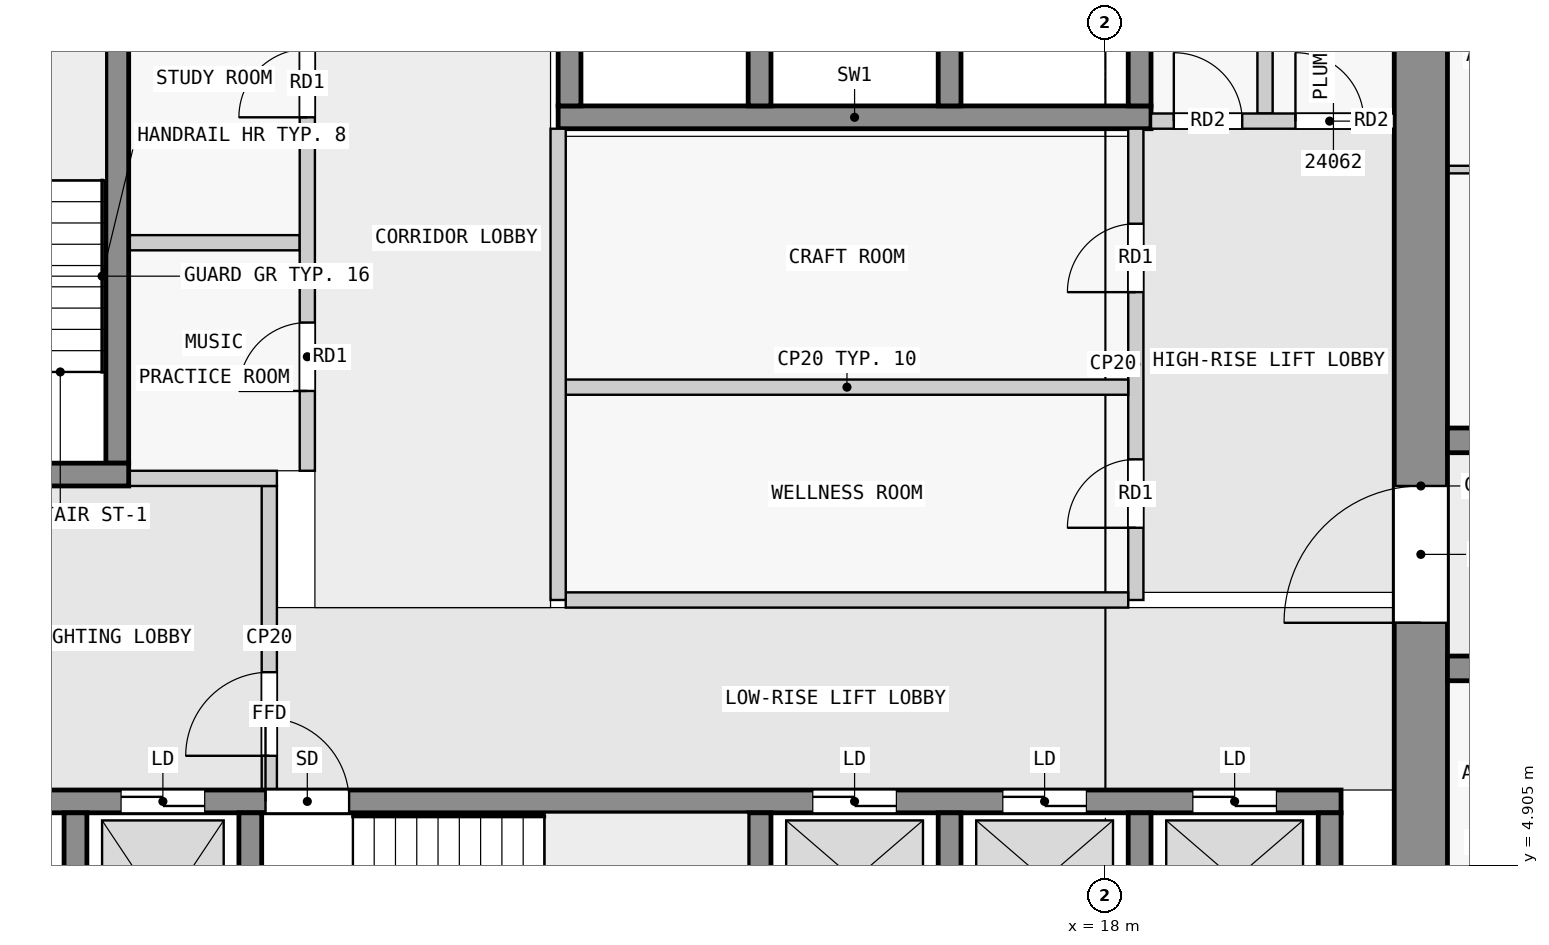
"""IFC4 building model, lengths in metres.
Left out: names, types, materials, properties, quantities, classifications, styles, units other than length and angle.
Written with IfcOpenShell. Run it as: python <this file> out.ifc"""

import sys

from ifc_helpers import new_model, si_unit, direction, frame, frame_2d, origin, place, context, subcontext, project, spatial, rectangle, extrude, element, fill, save


model = new_model("IFC4")
c1 = context("Model", 3, precision=1e-05, world=origin(), true_north=direction((0.0, 1.0)))
c2 = subcontext(c1, "Body", "Model", "MODEL_VIEW")
j1 = project(units=[si_unit("LENGTHUNIT", "METRE"), si_unit("PLANEANGLEUNIT", "RADIAN")], contexts=[c1])
p1 = place(None, origin())
s1 = spatial("IfcSite", under=j1, at=p1, CompositionType="ELEMENT")
p2 = place(p1, origin())
s2 = spatial("IfcBuilding", under=s1, at=p2, CompositionType="ELEMENT")
p3 = place(p2, frame((0.0, 0.0, 95.8)))
s3 = spatial("IfcBuildingStorey", under=s2, at=p3, CompositionType="ELEMENT", Elevation=95.8)
p4 = place(p3, frame((22.15, 2.5, 0.0), z_axis=(0.0, 0.0, 1.0), x_axis=(0.0, 1.0, 0.0)))
e1 = element("IfcWall", 1, at=p4, inside=s3, PredefinedType="SHEAR", context=c2, shape_type="SweptSolid", body=[
    extrude(rectangle(XDim=14.8, YDim=0.7, at=frame_2d((7.4, 0.0))), origin(), (0.0, 0.0, 1.0), 3.25),
])
p5 = place(p4, frame((5.6, 0.0, 0.0)))
e2 = element("IfcOpeningElement", 2, at=p5, cuts=e1, PredefinedType="OPENING", context=c2, shape_type="SweptSolid", body=[
    extrude(rectangle(XDim=1.8, YDim=2.1, at=frame_2d((0.9, 1.05))), frame((0.0, 0.36, 0.0), z_axis=(0.0, -1.0, 0.0), x_axis=(1.0, 0.0, 0.0)), (0.0, 0.0, 1.0), 0.72),
])
for number, where, z_axis, x_axis in (
    (3, (4.45, 2.8, 0.0), (0.0, 0.0, 1.0), (0.0, 1.0, 0.0)),
    (4, (6.75, 2.8, 0.0), (0.0, 0.0, 1.0), (0.0, 1.0, 0.0)),
    (5, (13.45, 2.8, 0.0), (0.0, 0.0, 1.0), (0.0, 1.0, 0.0)),
    (6, (15.95, 2.8, 0.0), (0.0, 0.0, 1.0), (0.0, 1.0, 0.0)),
    (7, (18.45, 2.8, 0.0), (0.0, 0.0, 1.0), (0.0, 1.0, 0.0)),
    (8, (20.95, 2.8, 0.0), (0.0, 0.0, 1.0), (0.0, 1.0, 0.0)),
):
    element("IfcWall", number, at=place(p3, frame(where, z_axis=z_axis, x_axis=x_axis)), inside=s3, PredefinedType="SHEAR", context=c2, shape_type="SweptSolid", body=[
        extrude(rectangle(XDim=2.8, YDim=0.3, at=frame_2d((1.4, 0.0))), origin(), (0.0, 0.0, 1.0), 3.25),
    ])
p6 = place(p3, frame((2.3, 5.75, 0.0), z_axis=(0.0, 0.0, 1.0), x_axis=(1.0, 0.0, 0.0)))
e9 = element("IfcWall", 9, at=p6, inside=s3, PredefinedType="SHEAR", context=c2, shape_type="SweptSolid", body=[
    extrude(rectangle(XDim=18.8, YDim=0.3, at=frame_2d((9.4, 0.0))), origin(), (0.0, 0.0, 1.0), 3.25),
])
p7 = place(p6, frame((4.65, 0.0, 0.0)))
e10 = element("IfcOpeningElement", 10, at=p7, cuts=e9, PredefinedType="OPENING", context=c2, shape_type="SweptSolid", body=[
    extrude(rectangle(XDim=1.1, YDim=2.1, at=frame_2d((0.55, 1.05))), frame((0.0, 0.16, 0.0), z_axis=(0.0, -1.0, 0.0), x_axis=(1.0, 0.0, 0.0)), (0.0, 0.0, 1.0), 0.32),
])
p8 = place(p6, frame((0.45, 0.0, 0.0)))
e11 = element("IfcOpeningElement", 11, at=p8, cuts=e9, PredefinedType="OPENING", context=c2, shape_type="SweptSolid", body=[
    extrude(rectangle(XDim=1.1, YDim=2.1, at=frame_2d((0.55, 1.05))), frame((0.0, 0.16, 0.0), z_axis=(0.0, -1.0, 0.0), x_axis=(1.0, 0.0, 0.0)), (0.0, 0.0, 1.0), 0.32),
])
p9 = place(p6, frame((2.75, 0.0, 0.0)))
e12 = element("IfcOpeningElement", 12, at=p9, cuts=e9, PredefinedType="OPENING", context=c2, shape_type="SweptSolid", body=[
    extrude(rectangle(XDim=1.1, YDim=2.1, at=frame_2d((0.55, 1.05))), frame((0.0, 0.16, 0.0), z_axis=(0.0, -1.0, 0.0), x_axis=(1.0, 0.0, 0.0)), (0.0, 0.0, 1.0), 0.32),
])
p10 = place(p6, frame((11.85, 0.0, 0.0)))
e13 = element("IfcOpeningElement", 13, at=p10, cuts=e9, PredefinedType="OPENING", context=c2, shape_type="SweptSolid", body=[
    extrude(rectangle(XDim=1.1, YDim=2.1, at=frame_2d((0.55, 1.05))), frame((0.0, 0.16, 0.0), z_axis=(0.0, -1.0, 0.0), x_axis=(1.0, 0.0, 0.0)), (0.0, 0.0, 1.0), 0.32),
])
p11 = place(p6, frame((14.35, 0.0, 0.0)))
e14 = element("IfcOpeningElement", 14, at=p11, cuts=e9, PredefinedType="OPENING", context=c2, shape_type="SweptSolid", body=[
    extrude(rectangle(XDim=1.1, YDim=2.1, at=frame_2d((0.55, 1.05))), frame((0.0, 0.16, 0.0), z_axis=(0.0, -1.0, 0.0), x_axis=(1.0, 0.0, 0.0)), (0.0, 0.0, 1.0), 0.32),
])
p12 = place(p6, frame((16.85, 0.0, 0.0)))
e15 = element("IfcOpeningElement", 15, at=p12, cuts=e9, PredefinedType="OPENING", context=c2, shape_type="SweptSolid", body=[
    extrude(rectangle(XDim=1.1, YDim=2.1, at=frame_2d((0.55, 1.05))), frame((0.0, 0.16, 0.0), z_axis=(0.0, -1.0, 0.0), x_axis=(1.0, 0.0, 0.0)), (0.0, 0.0, 1.0), 0.32),
])
p13 = place(p3, frame((2.3, 10.05, 0.0), z_axis=(0.0, 0.0, 1.0), x_axis=(1.0, 0.0, 0.0)))
e16 = element("IfcWall", 16, at=p13, inside=s3, PredefinedType="SHEAR", context=c2, shape_type="SweptSolid", body=[
    extrude(rectangle(XDim=2.85, YDim=0.3, at=frame_2d((1.425, 0.0))), origin(), (0.0, 0.0, 1.0), 3.25),
])
p14 = place(p13, frame((0.25, 0.0, 0.0)))
e17 = element("IfcOpeningElement", 17, at=p14, cuts=e16, PredefinedType="OPENING", context=c2, shape_type="SweptSolid", body=[
    extrude(rectangle(XDim=1.1, YDim=2.1, at=frame_2d((0.55, 1.05))), frame((0.0, 0.16, 0.0), z_axis=(0.0, -1.0, 0.0), x_axis=(1.0, 0.0, 0.0)), (0.0, 0.0, 1.0), 0.32),
])
p15 = place(p3, frame((5.0, 10.2, 0.0), z_axis=(0.0, 0.0, 1.0), x_axis=(0.0, 1.0, 0.0)))
e18 = element("IfcWall", 18, at=p15, inside=s3, PredefinedType="SHEAR", context=c2, shape_type="SweptSolid", body=[
    extrude(rectangle(XDim=6.4, YDim=0.3, at=frame_2d((3.2, 0.0))), origin(), (0.0, 0.0, 1.0), 3.25),
])
p16 = place(p3, frame((10.8, 14.75, 0.0), z_axis=(0.0, 0.0, 1.0), x_axis=(1.0, 0.0, 0.0)))
e19 = element("IfcWall", 19, at=p16, inside=s3, PredefinedType="SHEAR", context=c2, shape_type="SweptSolid", body=[
    extrude(rectangle(XDim=7.8, YDim=0.3, at=frame_2d((3.9, 0.0))), origin(), (0.0, 0.0, 1.0), 3.25),
])
for number, where, z_axis, x_axis in (
    (20, (10.95, 14.9, 0.0), (0.0, 0.0, 1.0), (0.0, 1.0, 0.0)),
    (21, (13.45, 14.9, 0.0), (0.0, 0.0, 1.0), (0.0, 1.0, 0.0)),
    (22, (15.95, 14.9, 0.0), (0.0, 0.0, 1.0), (0.0, 1.0, 0.0)),
    (23, (18.45, 14.9, 0.0), (0.0, 0.0, 1.0), (0.0, 1.0, 0.0)),
):
    element("IfcWall", number, at=place(p3, frame(where, z_axis=z_axis, x_axis=x_axis)), inside=s3, PredefinedType="SHEAR", context=c2, shape_type="SweptSolid", body=[
        extrude(rectangle(XDim=2.0, YDim=0.3, at=frame_2d((1.0, 0.0))), origin(), (0.0, 0.0, 1.0), 3.25),
    ])
p17 = place(p3, frame((22.5, 7.5, 0.0), z_axis=(0.0, 0.0, 1.0), x_axis=(1.0, 0.0, 0.0)))
e24 = element("IfcWall", 24, at=p17, inside=s3, PredefinedType="SHEAR", context=c2, shape_type="SweptSolid", body=[
    extrude(rectangle(XDim=22.5, YDim=0.325, at=frame_2d((11.25, 0.0))), origin(), (0.0, 0.0, 1.0), 3.25),
])
p18 = place(p17, frame((5.65, 0.0, 0.0)))
e25 = element("IfcOpeningElement", 25, at=p18, cuts=e24, PredefinedType="OPENING", context=c2, shape_type="SweptSolid", body=[
    extrude(rectangle(XDim=1.0, YDim=2.1, at=frame_2d((0.5, 1.05))), frame((0.0, 0.172, 0.0), z_axis=(0.0, -1.0, 0.0), x_axis=(1.0, 0.0, 0.0)), (0.0, 0.0, 1.0), 0.345),
])
p19 = place(p17, frame((15.25, 0.0, 0.0)))
e26 = element("IfcOpeningElement", 26, at=p19, cuts=e24, PredefinedType="OPENING", context=c2, shape_type="SweptSolid", body=[
    extrude(rectangle(XDim=1.0, YDim=2.1, at=frame_2d((0.5, 1.05))), frame((0.0, 0.172, 0.0), z_axis=(0.0, -1.0, 0.0), x_axis=(1.0, 0.0, 0.0)), (0.0, 0.0, 1.0), 0.345),
])
p20 = place(p17, frame((18.75, 0.0, 0.0)))
e27 = element("IfcOpeningElement", 27, at=p20, cuts=e24, PredefinedType="OPENING", context=c2, shape_type="SweptSolid", body=[
    extrude(rectangle(XDim=0.9, YDim=2.1, at=frame_2d((0.45, 1.05))), frame((0.0, 0.172, 0.0), z_axis=(0.0, -1.0, 0.0), x_axis=(1.0, 0.0, 0.0)), (0.0, 0.0, 1.0), 0.345),
])
p21 = place(p17, frame((20.95, 0.0, 0.0)))
e28 = element("IfcOpeningElement", 28, at=p21, cuts=e24, PredefinedType="OPENING", context=c2, shape_type="SweptSolid", body=[
    extrude(rectangle(XDim=1.0, YDim=2.1, at=frame_2d((0.5, 1.05))), frame((0.0, 0.172, 0.0), z_axis=(0.0, -1.0, 0.0), x_axis=(1.0, 0.0, 0.0)), (0.0, 0.0, 1.0), 0.345),
])
p22 = place(p3, frame((22.5, 10.5, 0.0), z_axis=(0.0, 0.0, 1.0), x_axis=(1.0, 0.0, 0.0)))
e29 = element("IfcWall", 29, at=p22, inside=s3, PredefinedType="SHEAR", context=c2, shape_type="SweptSolid", body=[
    extrude(rectangle(XDim=22.5, YDim=0.325, at=frame_2d((11.25, 0.0))), origin(), (0.0, 0.0, 1.0), 3.25),
])
p23 = place(p22, frame((4.75, 0.0, 0.0)))
e30 = element("IfcOpeningElement", 30, at=p23, cuts=e29, PredefinedType="OPENING", context=c2, shape_type="SweptSolid", body=[
    extrude(rectangle(XDim=1.0, YDim=2.1, at=frame_2d((0.5, 1.05))), frame((0.0, 0.172, 0.0), z_axis=(0.0, -1.0, 0.0), x_axis=(1.0, 0.0, 0.0)), (0.0, 0.0, 1.0), 0.345),
])
p24 = place(p22, frame((16.85, 0.0, 0.0)))
e31 = element("IfcOpeningElement", 31, at=p24, cuts=e29, PredefinedType="OPENING", context=c2, shape_type="SweptSolid", body=[
    extrude(rectangle(XDim=1.0, YDim=2.1, at=frame_2d((0.5, 1.05))), frame((0.0, 0.172, 0.0), z_axis=(0.0, -1.0, 0.0), x_axis=(1.0, 0.0, 0.0)), (0.0, 0.0, 1.0), 0.345),
])
p25 = place(p3, frame((7.0, 5.9, 0.0), z_axis=(0.0, 0.0, 1.0), x_axis=(0.0, 1.0, 0.0)))
e32 = element("IfcWall", 32, at=p25, inside=s3, PredefinedType="PARTITIONING", context=c2, shape_type="SweptSolid", body=[
    extrude(rectangle(XDim=4.0, YDim=0.2, at=frame_2d((2.0, 0.0))), origin(), (0.0, 0.0, 1.0), 3.25),
])
p26 = place(p25, frame((0.45, 0.0, 0.0)))
e33 = element("IfcOpeningElement", 33, at=p26, cuts=e32, PredefinedType="OPENING", context=c2, shape_type="SweptSolid", body=[
    extrude(rectangle(XDim=1.1, YDim=2.1, at=frame_2d((0.55, 1.05))), frame((0.0, 0.11, 0.0), z_axis=(0.0, -1.0, 0.0), x_axis=(1.0, 0.0, 0.0)), (0.0, 0.0, 1.0), 0.22),
])
p27 = place(p3, frame((5.15, 10.0, 0.0), z_axis=(0.0, 0.0, 1.0), x_axis=(1.0, 0.0, 0.0)))
e34 = element("IfcWall", 34, at=p27, inside=s3, PredefinedType="PARTITIONING", context=c2, shape_type="SweptSolid", body=[
    extrude(rectangle(XDim=1.95, YDim=0.2, at=frame_2d((0.975, 0.0))), origin(), (0.0, 0.0, 1.0), 3.25),
])
p28 = place(p3, frame((10.8, 8.4, 0.0), z_axis=(0.0, 0.0, 1.0), x_axis=(0.0, 1.0, 0.0)))
e35 = element("IfcWall", 35, at=p28, inside=s3, PredefinedType="PARTITIONING", context=c2, shape_type="SweptSolid", body=[
    extrude(rectangle(XDim=6.2, YDim=0.2, at=frame_2d((3.1, 0.0))), origin(), (0.0, 0.0, 1.0), 3.25),
])
p29 = place(p3, frame((10.9, 8.4, 0.0), z_axis=(0.0, 0.0, 1.0), x_axis=(1.0, 0.0, 0.0)))
e36 = element("IfcWall", 36, at=p29, inside=s3, PredefinedType="PARTITIONING", context=c2, shape_type="SweptSolid", body=[
    extrude(rectangle(XDim=7.4, YDim=0.2, at=frame_2d((3.7, 0.0))), origin(), (0.0, 0.0, 1.0), 3.25),
])
p30 = place(p3, frame((18.4, 8.4, 0.0), z_axis=(0.0, 0.0, 1.0), x_axis=(0.0, 1.0, 0.0)))
e37 = element("IfcWall", 37, at=p30, inside=s3, PredefinedType="PARTITIONING", context=c2, shape_type="SweptSolid", body=[
    extrude(rectangle(XDim=6.2, YDim=0.2, at=frame_2d((3.1, 0.0))), origin(), (0.0, 0.0, 1.0), 3.25),
])
p31 = place(p30, frame((0.95, 0.0, 0.0)))
e38 = element("IfcOpeningElement", 38, at=p31, cuts=e37, PredefinedType="OPENING", context=c2, shape_type="SweptSolid", body=[
    extrude(rectangle(XDim=0.9, YDim=2.1, at=frame_2d((0.45, 1.05))), frame((0.0, 0.11, 0.0), z_axis=(0.0, -1.0, 0.0), x_axis=(1.0, 0.0, 0.0)), (0.0, 0.0, 1.0), 0.22),
])
p32 = place(p30, frame((4.05, 0.0, 0.0)))
e39 = element("IfcOpeningElement", 39, at=p32, cuts=e37, PredefinedType="OPENING", context=c2, shape_type="SweptSolid", body=[
    extrude(rectangle(XDim=0.9, YDim=2.1, at=frame_2d((0.45, 1.05))), frame((0.0, 0.11, 0.0), z_axis=(0.0, -1.0, 0.0), x_axis=(1.0, 0.0, 0.0)), (0.0, 0.0, 1.0), 0.22),
])
p33 = place(p3, frame((10.9, 11.2, 0.0), z_axis=(0.0, 0.0, 1.0), x_axis=(1.0, 0.0, 0.0)))
e40 = element("IfcWall", 40, at=p33, inside=s3, PredefinedType="PARTITIONING", context=c2, shape_type="SweptSolid", body=[
    extrude(rectangle(XDim=7.4, YDim=0.2, at=frame_2d((3.7, 0.0))), origin(), (0.0, 0.0, 1.0), 3.25),
])
p34 = place(p3, frame((7.5, 10.1, 0.0), z_axis=(0.0, 0.0, 1.0), x_axis=(0.0, 1.0, 0.0)))
e41 = element("IfcWall", 41, at=p34, inside=s3, PredefinedType="PARTITIONING", context=c2, shape_type="SweptSolid", body=[
    extrude(rectangle(XDim=7.2, YDim=0.2, at=frame_2d((3.6, 0.0))), origin(), (0.0, 0.0, 1.0), 3.25),
])
p35 = place(p34, frame((1.05, 0.0, 0.0)))
e42 = element("IfcOpeningElement", 42, at=p35, cuts=e41, PredefinedType="OPENING", context=c2, shape_type="SweptSolid", body=[
    extrude(rectangle(XDim=0.9, YDim=2.1, at=frame_2d((0.45, 1.05))), frame((0.0, 0.11, 0.0), z_axis=(0.0, -1.0, 0.0), x_axis=(1.0, 0.0, 0.0)), (0.0, 0.0, 1.0), 0.22),
])
p36 = place(p34, frame((4.65, 0.0, 0.0)))
e43 = element("IfcOpeningElement", 43, at=p36, cuts=e41, PredefinedType="OPENING", context=c2, shape_type="SweptSolid", body=[
    extrude(rectangle(XDim=0.9, YDim=2.1, at=frame_2d((0.45, 1.05))), frame((0.0, 0.11, 0.0), z_axis=(0.0, -1.0, 0.0), x_axis=(1.0, 0.0, 0.0)), (0.0, 0.0, 1.0), 0.22),
])
p37 = place(p3, frame((5.15, 13.1, 0.0), z_axis=(0.0, 0.0, 1.0), x_axis=(1.0, 0.0, 0.0)))
e44 = element("IfcWall", 44, at=p37, inside=s3, PredefinedType="PARTITIONING", context=c2, shape_type="SweptSolid", body=[
    extrude(rectangle(XDim=2.25, YDim=0.2, at=frame_2d((1.125, 0.0))), origin(), (0.0, 0.0, 1.0), 3.25),
])
p38 = place(p3, frame((18.6, 14.7, 0.0), z_axis=(0.0, 0.0, 1.0), x_axis=(1.0, 0.0, 0.0)))
e45 = element("IfcWall", 45, at=p38, inside=s3, PredefinedType="PARTITIONING", context=c2, shape_type="SweptSolid", body=[
    extrude(rectangle(XDim=3.2, YDim=0.2, at=frame_2d((1.6, 0.0))), origin(), (0.0, 0.0, 1.0), 3.25),
])
p39 = place(p38, frame((0.3, 0.0, 0.0)))
e46 = element("IfcOpeningElement", 46, at=p39, cuts=e45, PredefinedType="OPENING", context=c2, shape_type="SweptSolid", body=[
    extrude(rectangle(XDim=0.9, YDim=2.1, at=frame_2d((0.45, 1.05))), frame((0.0, 0.11, 0.0), z_axis=(0.0, -1.0, 0.0), x_axis=(1.0, 0.0, 0.0)), (0.0, 0.0, 1.0), 0.22),
])
p40 = place(p38, frame((1.9, 0.0, 0.0)))
e47 = element("IfcOpeningElement", 47, at=p40, cuts=e45, PredefinedType="OPENING", context=c2, shape_type="SweptSolid", body=[
    extrude(rectangle(XDim=0.9, YDim=2.1, at=frame_2d((0.45, 1.05))), frame((0.0, 0.11, 0.0), z_axis=(0.0, -1.0, 0.0), x_axis=(1.0, 0.0, 0.0)), (0.0, 0.0, 1.0), 0.22),
])
p41 = place(p3, frame((20.1, 14.8, 0.0), z_axis=(0.0, 0.0, 1.0), x_axis=(0.0, 1.0, 0.0)))
e48 = element("IfcWall", 48, at=p41, inside=s3, PredefinedType="PARTITIONING", context=c2, shape_type="SweptSolid", body=[
    extrude(rectangle(XDim=2.5, YDim=0.2, at=frame_2d((1.25, 0.0))), origin(), (0.0, 0.0, 1.0), 3.25),
])
p42 = place(p3, frame((22.5, 14.062, 0.0), z_axis=(0.0, 0.0, 1.0), x_axis=(1.0, 0.0, 0.0)))
e49 = element("IfcWall", 49, at=p42, inside=s3, PredefinedType="PARTITIONING", context=c2, shape_type="SweptSolid", body=[
    extrude(rectangle(XDim=9.0, YDim=0.1, at=frame_2d((4.5, 0.0))), origin(), (0.0, 0.0, 1.0), 3.25),
])
p43 = place(p42, frame((1.85, 0.0, 0.0)))
e50 = element("IfcOpeningElement", 50, at=p43, cuts=e49, PredefinedType="OPENING", context=c2, shape_type="SweptSolid", body=[
    extrude(rectangle(XDim=0.9, YDim=2.1, at=frame_2d((0.45, 1.05))), frame((0.0, 0.06, 0.0), z_axis=(0.0, -1.0, 0.0), x_axis=(1.0, 0.0, 0.0)), (0.0, 0.0, 1.0), 0.12),
])
p44 = place(p42, frame((6.25, 0.0, 0.0)))
e51 = element("IfcOpeningElement", 51, at=p44, cuts=e49, PredefinedType="OPENING", context=c2, shape_type="SweptSolid", body=[
    extrude(rectangle(XDim=0.9, YDim=2.1, at=frame_2d((0.45, 1.05))), frame((0.0, 0.06, 0.0), z_axis=(0.0, -1.0, 0.0), x_axis=(1.0, 0.0, 0.0)), (0.0, 0.0, 1.0), 0.12),
])
p45 = place(p26, origin())
e52 = element("IfcDoor", 52, at=p45, inside=s3, OperationType="SINGLE_SWING_LEFT", PredefinedType="DOOR", context=c2, shape_type="SweptSolid", body=[
    extrude(rectangle(XDim=1.1, YDim=2.1, at=frame_2d((0.55, 1.05))), frame((0.0, 0.025, 0.0), z_axis=(0.0, -1.0, 0.0), x_axis=(1.0, 0.0, 0.0)), (0.0, 0.0, 1.0), 0.05),
])
fill(e33, e52)
p46 = place(p31, origin())
e53 = element("IfcDoor", 53, at=p46, inside=s3, OperationType="SINGLE_SWING_LEFT", PredefinedType="DOOR", context=c2, shape_type="SweptSolid", body=[
    extrude(rectangle(XDim=0.9, YDim=2.1, at=frame_2d((0.45, 1.05))), frame((0.0, 0.025, 0.0), z_axis=(0.0, -1.0, 0.0), x_axis=(1.0, 0.0, 0.0)), (0.0, 0.0, 1.0), 0.05),
])
fill(e38, e53)
p47 = place(p32, origin())
e54 = element("IfcDoor", 54, at=p47, inside=s3, OperationType="SINGLE_SWING_LEFT", PredefinedType="DOOR", context=c2, shape_type="SweptSolid", body=[
    extrude(rectangle(XDim=0.9, YDim=2.1, at=frame_2d((0.45, 1.05))), frame((0.0, 0.025, 0.0), z_axis=(0.0, -1.0, 0.0), x_axis=(1.0, 0.0, 0.0)), (0.0, 0.0, 1.0), 0.05),
])
fill(e39, e54)
p48 = place(p7, origin())
e55 = element("IfcDoor", 55, at=p48, inside=s3, OperationType="SINGLE_SWING_LEFT", PredefinedType="DOOR", context=c2, shape_type="SweptSolid", body=[
    extrude(rectangle(XDim=1.1, YDim=2.1, at=frame_2d((0.55, 1.05))), frame((0.0, 0.025, 0.0), z_axis=(0.0, -1.0, 0.0), x_axis=(1.0, 0.0, 0.0)), (0.0, 0.0, 1.0), 0.05),
])
fill(e10, e55)
p49 = place(p9, origin())
e56 = element("IfcDoor", 56, at=p49, inside=s3, OperationType="DOUBLE_DOOR_SLIDING", PredefinedType="DOOR", context=c2, shape_type="SweptSolid", body=[
    extrude(rectangle(XDim=1.1, YDim=2.1, at=frame_2d((0.55, 1.05))), frame((0.0, 0.025, 0.0), z_axis=(0.0, -1.0, 0.0), x_axis=(1.0, 0.0, 0.0)), (0.0, 0.0, 1.0), 0.05),
])
fill(e12, e56)
p50 = place(p10, origin())
e57 = element("IfcDoor", 57, at=p50, inside=s3, OperationType="DOUBLE_DOOR_SLIDING", PredefinedType="DOOR", context=c2, shape_type="SweptSolid", body=[
    extrude(rectangle(XDim=1.1, YDim=2.1, at=frame_2d((0.55, 1.05))), frame((0.0, 0.025, 0.0), z_axis=(0.0, -1.0, 0.0), x_axis=(1.0, 0.0, 0.0)), (0.0, 0.0, 1.0), 0.05),
])
fill(e13, e57)
p51 = place(p11, origin())
e58 = element("IfcDoor", 58, at=p51, inside=s3, OperationType="DOUBLE_DOOR_SLIDING", PredefinedType="DOOR", context=c2, shape_type="SweptSolid", body=[
    extrude(rectangle(XDim=1.1, YDim=2.1, at=frame_2d((0.55, 1.05))), frame((0.0, 0.025, 0.0), z_axis=(0.0, -1.0, 0.0), x_axis=(1.0, 0.0, 0.0)), (0.0, 0.0, 1.0), 0.05),
])
fill(e14, e58)
p52 = place(p12, origin())
e59 = element("IfcDoor", 59, at=p52, inside=s3, OperationType="DOUBLE_DOOR_SLIDING", PredefinedType="DOOR", context=c2, shape_type="SweptSolid", body=[
    extrude(rectangle(XDim=1.1, YDim=2.1, at=frame_2d((0.55, 1.05))), frame((0.0, 0.025, 0.0), z_axis=(0.0, -1.0, 0.0), x_axis=(1.0, 0.0, 0.0)), (0.0, 0.0, 1.0), 0.05),
])
fill(e15, e59)
p53 = place(p5, origin())
e60 = element("IfcDoor", 60, at=p53, inside=s3, OperationType="DOUBLE_DOOR_SINGLE_SWING", PredefinedType="DOOR", context=c2, shape_type="SweptSolid", body=[
    extrude(rectangle(XDim=1.8, YDim=2.1, at=frame_2d((0.9, 1.05))), frame((0.0, 0.025, 0.0), z_axis=(0.0, -1.0, 0.0), x_axis=(1.0, 0.0, 0.0)), (0.0, 0.0, 1.0), 0.05),
])
fill(e2, e60)
p54 = place(p35, origin())
e61 = element("IfcDoor", 61, at=p54, inside=s3, OperationType="SINGLE_SWING_RIGHT", PredefinedType="DOOR", context=c2, shape_type="SweptSolid", body=[
    extrude(rectangle(XDim=0.9, YDim=2.1, at=frame_2d((0.45, 1.05))), frame((0.0, 0.025, 0.0), z_axis=(0.0, -1.0, 0.0), x_axis=(1.0, 0.0, 0.0)), (0.0, 0.0, 1.0), 0.05),
])
fill(e42, e61)
p55 = place(p36, origin())
e62 = element("IfcDoor", 62, at=p55, inside=s3, OperationType="SINGLE_SWING_RIGHT", PredefinedType="DOOR", context=c2, shape_type="SweptSolid", body=[
    extrude(rectangle(XDim=0.9, YDim=2.1, at=frame_2d((0.45, 1.05))), frame((0.0, 0.025, 0.0), z_axis=(0.0, -1.0, 0.0), x_axis=(1.0, 0.0, 0.0)), (0.0, 0.0, 1.0), 0.05),
])
fill(e43, e62)
p56 = place(p39, origin())
e63 = element("IfcDoor", 63, at=p56, inside=s3, OperationType="SINGLE_SWING_LEFT", PredefinedType="DOOR", context=c2, shape_type="SweptSolid", body=[
    extrude(rectangle(XDim=0.9, YDim=2.1, at=frame_2d((0.45, 1.05))), frame((0.0, 0.025, 0.0), z_axis=(0.0, -1.0, 0.0), x_axis=(1.0, 0.0, 0.0)), (0.0, 0.0, 1.0), 0.05),
])
fill(e46, e63)
p57 = place(p40, origin())
e64 = element("IfcDoor", 64, at=p57, inside=s3, OperationType="SINGLE_SWING_LEFT", PredefinedType="DOOR", context=c2, shape_type="SweptSolid", body=[
    extrude(rectangle(XDim=0.9, YDim=2.1, at=frame_2d((0.45, 1.05))), frame((0.0, 0.025, 0.0), z_axis=(0.0, -1.0, 0.0), x_axis=(1.0, 0.0, 0.0)), (0.0, 0.0, 1.0), 0.05),
])
fill(e47, e64)
save(model, sys.argv[1])
